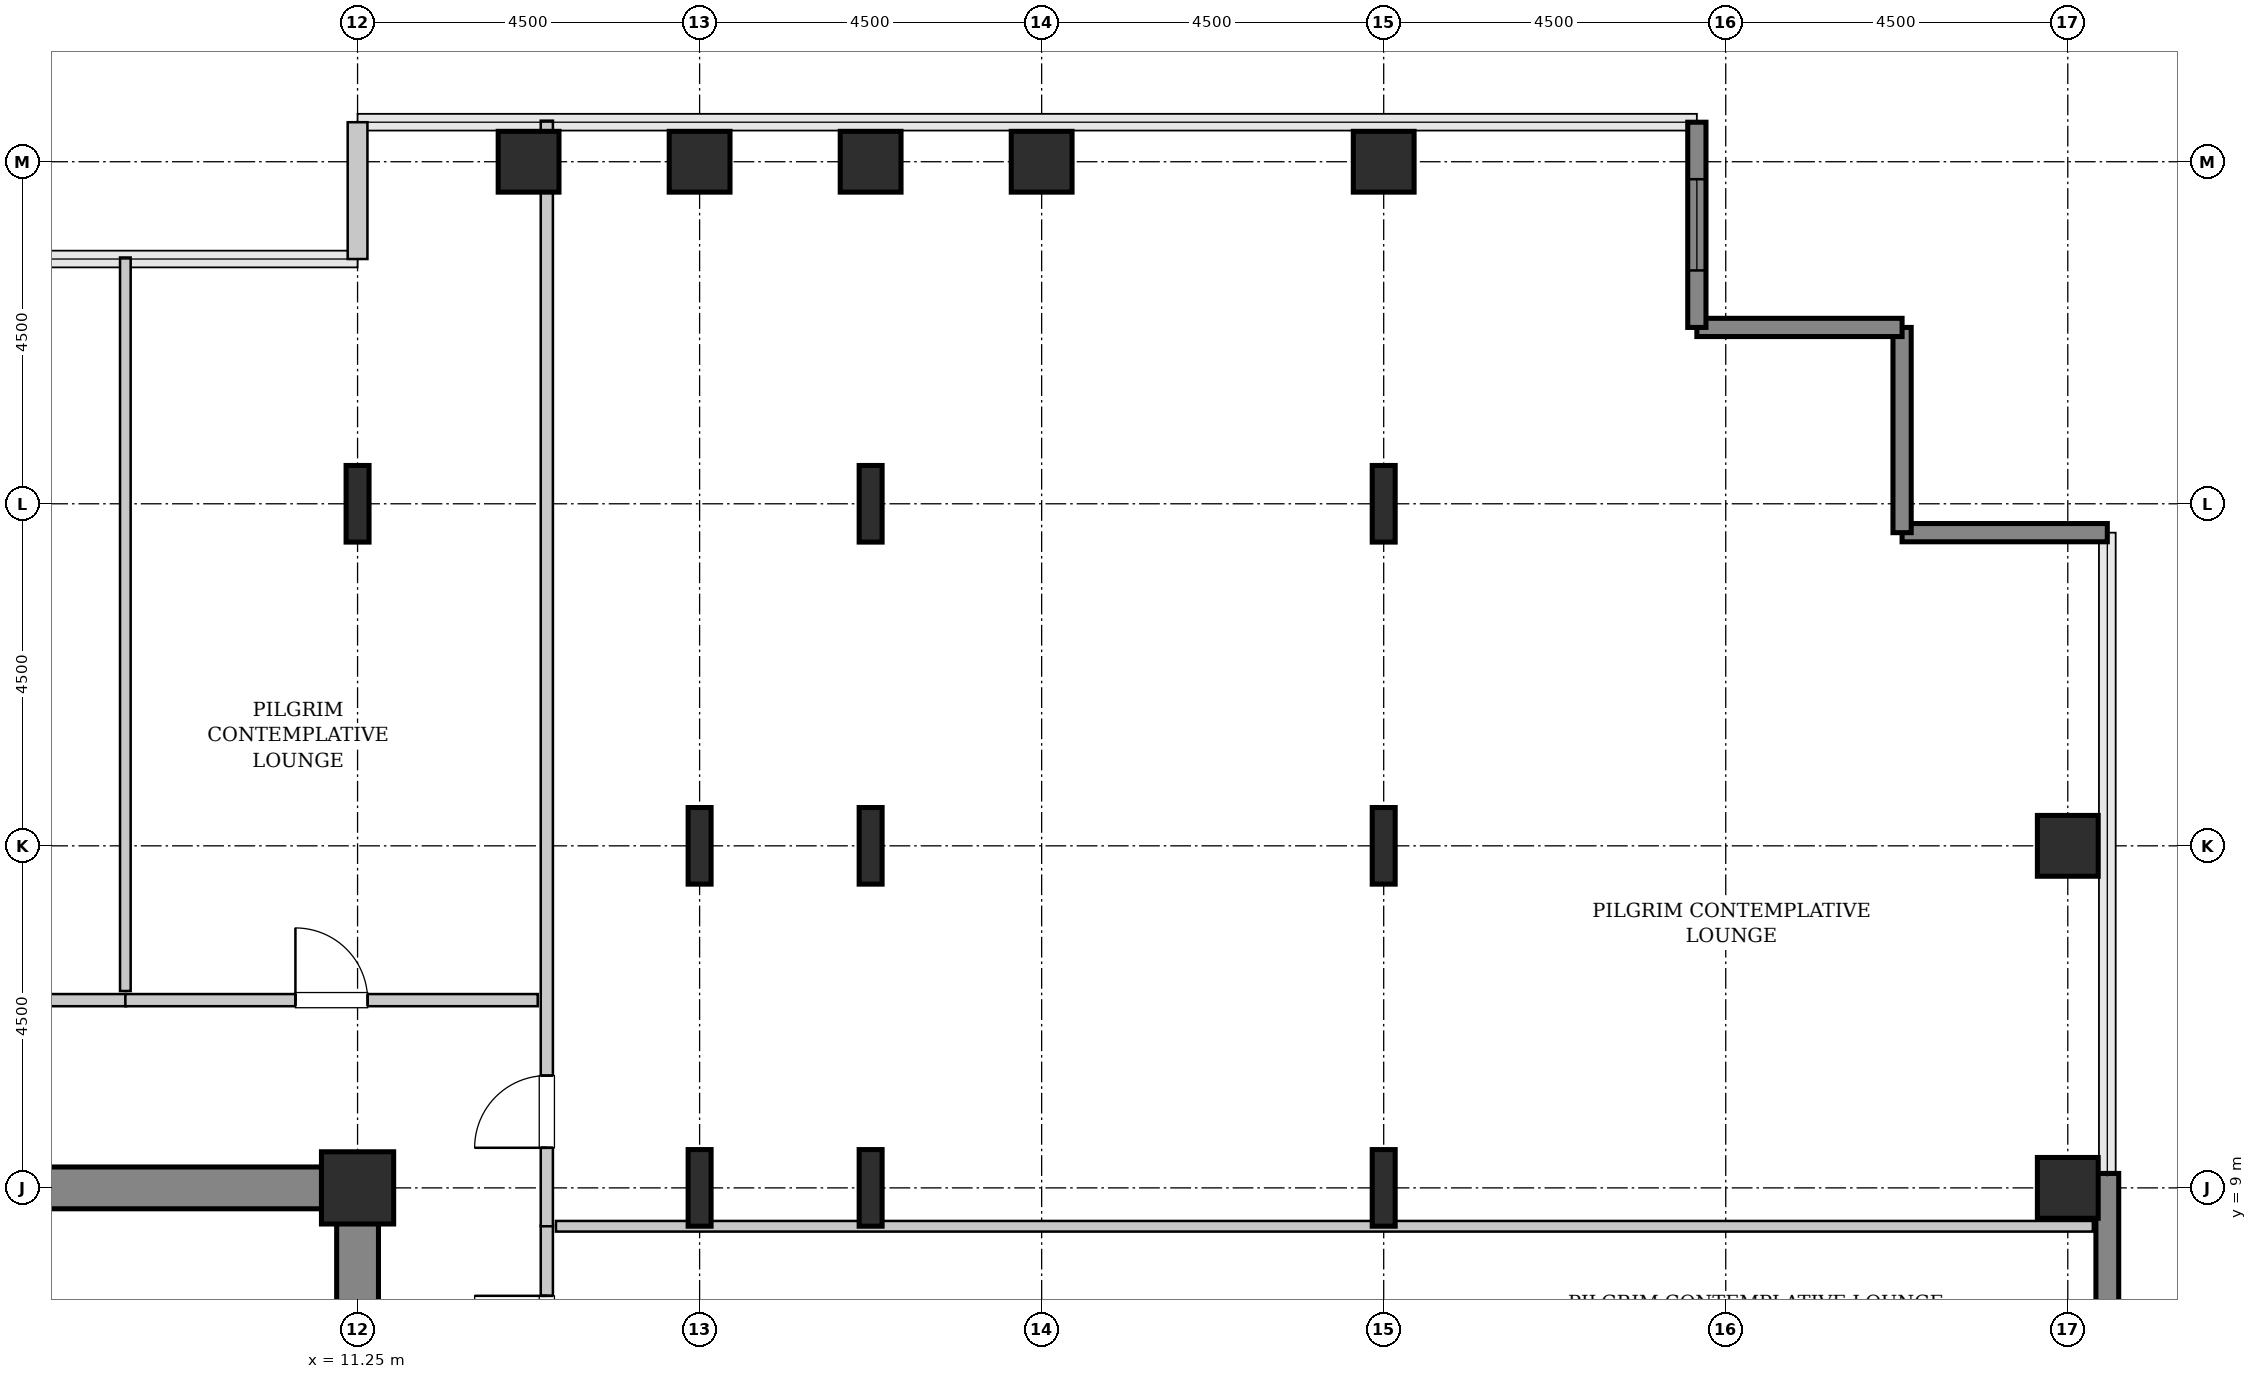
"""IFC4 building model, lengths in metres.
Left out: names, types, materials, properties, quantities, classifications, styles, units other than length and angle.
Written with IfcOpenShell. Run it as: python <this file> out.ifc"""

import sys

from ifc_helpers import new_model, si_unit, direction, frame, frame_2d, origin, origin_2d, place, context, subcontext, project, spatial, rectangle, hollow_rectangle, i_section, extrude, source, transform, mapped, element, fill, save


model = new_model("IFC4")
c1 = context("Model", 3, precision=1e-05, world=origin(), true_north=direction((0.0, 1.0)))
c2 = subcontext(c1, "Body", "Model", "MODEL_VIEW")
j1 = project(units=[si_unit("LENGTHUNIT", "METRE"), si_unit("PLANEANGLEUNIT", "RADIAN")], contexts=[c1])
p1 = place(None, origin())
s1 = spatial("IfcSite", under=j1, at=p1, CompositionType="ELEMENT")
p2 = place(p1, origin())
s2 = spatial("IfcBuilding", under=s1, at=p2, CompositionType="ELEMENT")
p3 = place(p2, frame((0.0, 0.0, 136.4)))
s3 = spatial("IfcBuildingStorey", under=s2, at=p3, CompositionType="ELEMENT", Elevation=136.4)
m1 = source(origin(), c2, "Body", "SweptSolid", [
    extrude(rectangle(XDim=9.975, YDim=0.55, at=frame_2d((4.987, 0.0))), origin(), (0.0, 0.0, 1.0), 3.8),
])
p4 = place(p3, frame((1.55, 9.0, 0.0), z_axis=(0.0, 0.0, 1.0), x_axis=(1.0, 0.0, 0.0)))
e1 = element("IfcWall", 1, at=p4, inside=s3, PredefinedType="SHEAR", context=c2, shape_type="MappedRepresentation", body=[
    mapped(m1, transform((0.0, 0.0, 0.0), x_axis=(1.0, 0.0, 0.0), y_axis=(0.0, 1.0, 0.0), z_axis=(0.0, 0.0, 1.0), scale=1.0)),
])
m2 = source(origin(), c2, "Body", "SweptSolid", [
    extrude(rectangle(XDim=7.375, YDim=0.55, at=frame_2d((3.688, 0.0))), origin(), (0.0, 0.0, 1.0), 3.8),
])
p5 = place(p3, frame((11.25, 1.35, 0.0), z_axis=(0.0, 0.0, 1.0), x_axis=(0.0, 1.0, 0.0)))
e2 = element("IfcWall", 2, at=p5, inside=s3, PredefinedType="SHEAR", context=c2, shape_type="MappedRepresentation", body=[
    mapped(m2, transform((0.0, 0.0, 0.0), x_axis=(1.0, 0.0, 0.0), y_axis=(0.0, 1.0, 0.0), z_axis=(0.0, 0.0, 1.0), scale=1.0)),
])
m3 = source(origin(), c2, "Body", "SweptSolid", [
    extrude(hollow_rectangle(XDim=0.95, YDim=0.95, WallThickness=0.045, InnerFilletRadius=0.045, OuterFilletRadius=0.09, at=origin_2d()), origin(), (0.0, 0.0, 1.0), 3.8),
])
p6 = place(p3, frame((11.25, 9.0, 0.0), z_axis=(0.0, 0.0, 1.0), x_axis=(1.0, 0.0, 0.0)))
e3 = element("IfcColumn", 3, at=p6, inside=s3, PredefinedType="COLUMN", context=c2, shape_type="MappedRepresentation", body=[
    mapped(m3, transform((0.0, 0.0, 0.0), x_axis=(1.0, 0.0, 0.0), y_axis=(0.0, 1.0, 0.0), z_axis=(0.0, 0.0, 1.0), scale=1.0)),
])
m4 = source(origin(), c2, "Body", "SweptSolid", [
    extrude(i_section(OverallWidth=0.302, OverallDepth=1.008, WebThickness=0.021, FlangeThickness=0.04, FilletRadius=0.03, at=origin_2d()), origin(), (0.0, 0.0, 1.0), 3.8),
])
p7 = place(p3, frame((11.25, 18.0, 0.0), z_axis=(0.0, 0.0, 1.0), x_axis=(1.0, 0.0, 0.0)))
e4 = element("IfcColumn", 4, at=p7, inside=s3, PredefinedType="COLUMN", context=c2, shape_type="MappedRepresentation", body=[
    mapped(m4, transform((0.0, 0.0, 0.0), x_axis=(1.0, 0.0, 0.0), y_axis=(0.0, 1.0, 0.0), z_axis=(0.0, 0.0, 1.0), scale=1.0)),
])
m5 = source(origin(), c2, "Body", "SweptSolid", [
    extrude(hollow_rectangle(XDim=0.8, YDim=0.8, WallThickness=0.04, InnerFilletRadius=0.04, OuterFilletRadius=0.08, at=origin_2d()), origin(), (0.0, 0.0, 1.0), 3.8),
])
p8 = place(p3, frame((13.5, 22.5, 0.0), z_axis=(0.0, 0.0, 1.0), x_axis=(1.0, 0.0, 0.0)))
e5 = element("IfcColumn", 5, at=p8, inside=s3, PredefinedType="COLUMN", context=c2, shape_type="MappedRepresentation", body=[
    mapped(m5, transform((0.0, 0.0, 0.0), x_axis=(1.0, 0.0, 0.0), y_axis=(0.0, 1.0, 0.0), z_axis=(0.0, 0.0, 1.0), scale=1.0)),
])
for number, where, z_axis, x_axis in (
    (6, (15.75, 9.0, 0.0), (0.0, 0.0, 1.0), (1.0, 0.0, 0.0)),
    (7, (15.75, 13.5, 0.0), (0.0, 0.0, 1.0), (1.0, 0.0, 0.0)),
):
    element("IfcColumn", number, at=place(p3, frame(where, z_axis=z_axis, x_axis=x_axis)), inside=s3, PredefinedType="COLUMN", context=c2, shape_type="MappedRepresentation", body=[
        mapped(m4, transform((0.0, 0.0, 0.0), x_axis=(1.0, 0.0, 0.0), y_axis=(0.0, 1.0, 0.0), z_axis=(0.0, 0.0, 1.0), scale=1.0)),
    ])
p9 = place(p3, frame((15.75, 22.5, 0.0), z_axis=(0.0, 0.0, 1.0), x_axis=(1.0, 0.0, 0.0)))
e8 = element("IfcColumn", 8, at=p9, inside=s3, PredefinedType="COLUMN", context=c2, shape_type="MappedRepresentation", body=[
    mapped(m5, transform((0.0, 0.0, 0.0), x_axis=(1.0, 0.0, 0.0), y_axis=(0.0, 1.0, 0.0), z_axis=(0.0, 0.0, 1.0), scale=1.0)),
])
for number, where, z_axis, x_axis in (
    (9, (18.0, 9.0, 0.0), (0.0, 0.0, 1.0), (1.0, 0.0, 0.0)),
    (10, (18.0, 13.5, 0.0), (0.0, 0.0, 1.0), (1.0, 0.0, 0.0)),
    (11, (18.0, 18.0, 0.0), (0.0, 0.0, 1.0), (1.0, 0.0, 0.0)),
):
    element("IfcColumn", number, at=place(p3, frame(where, z_axis=z_axis, x_axis=x_axis)), inside=s3, PredefinedType="COLUMN", context=c2, shape_type="MappedRepresentation", body=[
        mapped(m4, transform((0.0, 0.0, 0.0), x_axis=(1.0, 0.0, 0.0), y_axis=(0.0, 1.0, 0.0), z_axis=(0.0, 0.0, 1.0), scale=1.0)),
    ])
for number, where, z_axis, x_axis in (
    (12, (18.0, 22.5, 0.0), (0.0, 0.0, 1.0), (1.0, 0.0, 0.0)),
    (13, (20.25, 22.5, 0.0), (0.0, 0.0, 1.0), (1.0, 0.0, 0.0)),
):
    element("IfcColumn", number, at=place(p3, frame(where, z_axis=z_axis, x_axis=x_axis)), inside=s3, PredefinedType="COLUMN", context=c2, shape_type="MappedRepresentation", body=[
        mapped(m5, transform((0.0, 0.0, 0.0), x_axis=(1.0, 0.0, 0.0), y_axis=(0.0, 1.0, 0.0), z_axis=(0.0, 0.0, 1.0), scale=1.0)),
    ])
for number, where, z_axis, x_axis in (
    (14, (24.75, 9.0, 0.0), (0.0, 0.0, 1.0), (1.0, 0.0, 0.0)),
    (15, (24.75, 13.5, 0.0), (0.0, 0.0, 1.0), (1.0, 0.0, 0.0)),
    (16, (24.75, 18.0, 0.0), (0.0, 0.0, 1.0), (1.0, 0.0, 0.0)),
):
    element("IfcColumn", number, at=place(p3, frame(where, z_axis=z_axis, x_axis=x_axis)), inside=s3, PredefinedType="COLUMN", context=c2, shape_type="MappedRepresentation", body=[
        mapped(m4, transform((0.0, 0.0, 0.0), x_axis=(1.0, 0.0, 0.0), y_axis=(0.0, 1.0, 0.0), z_axis=(0.0, 0.0, 1.0), scale=1.0)),
    ])
for number, where, z_axis, x_axis in (
    (17, (24.75, 22.5, 0.0), (0.0, 0.0, 1.0), (1.0, 0.0, 0.0)),
    (18, (33.75, 9.0, 0.0), (0.0, 0.0, 1.0), (1.0, 0.0, 0.0)),
    (19, (33.75, 13.5, 0.0), (0.0, 0.0, 1.0), (1.0, 0.0, 0.0)),
):
    element("IfcColumn", number, at=place(p3, frame(where, z_axis=z_axis, x_axis=x_axis)), inside=s3, PredefinedType="COLUMN", context=c2, shape_type="MappedRepresentation", body=[
        mapped(m5, transform((0.0, 0.0, 0.0), x_axis=(1.0, 0.0, 0.0), y_axis=(0.0, 1.0, 0.0), z_axis=(0.0, 0.0, 1.0), scale=1.0)),
    ])
m6 = source(origin(), c2, "Body", "SweptSolid", [
    extrude(rectangle(XDim=4.88, YDim=0.3, at=frame_2d((2.44, 0.0))), origin(), (0.0, 0.0, 1.0), 3.55),
])
p10 = place(p3, frame((34.27, 4.31, 0.0), z_axis=(0.0, 0.0, 1.0), x_axis=(0.0, 1.0, 0.0)))
e20 = element("IfcWall", 20, at=p10, inside=s3, PredefinedType="SHEAR", context=c2, shape_type="MappedRepresentation", body=[
    mapped(m6, transform((0.0, 0.0, 0.0), x_axis=(1.0, 0.0, 0.0), y_axis=(0.0, 1.0, 0.0), z_axis=(0.0, 0.0, 1.0), scale=1.0)),
])
m7 = source(origin(), c2, "Body", "SweptSolid", [
    extrude(rectangle(XDim=2.7, YDim=0.24, at=frame_2d((1.35, 0.0))), origin(), (0.0, 0.0, 1.0), 3.55),
])
for number, where, z_axis, x_axis in (
    (21, (34.27, 17.62, 0.0), (0.0, 0.0, 1.0), (-1.0, 0.0, 0.0)),
    (22, (31.57, 17.62, 0.0), (0.0, 0.0, 1.0), (0.0, 1.0, 0.0)),
    (23, (31.57, 20.32, 0.0), (0.0, 0.0, 1.0), (-1.0, 0.0, 0.0)),
):
    element("IfcWall", number, at=place(p3, frame(where, z_axis=z_axis, x_axis=x_axis)), inside=s3, PredefinedType="SHEAR", context=c2, shape_type="MappedRepresentation", body=[
        mapped(m7, transform((0.0, 0.0, 0.0), x_axis=(1.0, 0.0, 0.0), y_axis=(0.0, 1.0, 0.0), z_axis=(0.0, 0.0, 1.0), scale=1.0)),
    ])
p11 = place(p3, frame((28.87, 20.32, 0.0), z_axis=(0.0, 0.0, 1.0), x_axis=(0.0, 1.0, 0.0)))
e24 = element("IfcWall", 24, at=p11, inside=s3, PredefinedType="SHEAR", context=c2, shape_type="MappedRepresentation", body=[
    mapped(m7, transform((0.0, 0.0, 0.0), x_axis=(1.0, 0.0, 0.0), y_axis=(0.0, 1.0, 0.0), z_axis=(0.0, 0.0, 1.0), scale=1.0)),
])
p12 = place(p11, frame((0.75, 0.0, 0.85)))
e25 = element("IfcOpeningElement", 25, at=p12, cuts=e24, PredefinedType="OPENING", context=c2, shape_type="SweptSolid", body=[
    extrude(rectangle(XDim=1.2, YDim=1.8, at=frame_2d((0.6, 0.9))), frame((0.0, 0.13, 0.0), z_axis=(0.0, -1.0, 0.0), x_axis=(1.0, 0.0, 0.0)), (0.0, 0.0, 1.0), 0.26),
])
m8 = source(origin(), c2, "Body", "SweptSolid", [
    extrude(rectangle(XDim=1.8, YDim=0.26, at=frame_2d((0.9, 0.0))), origin(), (0.0, 0.0, 1.0), 3.55),
])
p13 = place(p3, frame((11.25, 23.02, 0.0), z_axis=(0.0, 0.0, 1.0), x_axis=(0.0, -1.0, 0.0)))
e26 = element("IfcWall", 26, at=p13, inside=s3, PredefinedType="SOLIDWALL", context=c2, shape_type="MappedRepresentation", body=[
    mapped(m8, transform((0.0, 0.0, 0.0), x_axis=(1.0, 0.0, 0.0), y_axis=(0.0, 1.0, 0.0), z_axis=(0.0, 0.0, 1.0), scale=1.0)),
])
m9 = source(origin(), c2, "Body", "SweptSolid", [
    extrude(rectangle(XDim=2.8, YDim=0.16, at=frame_2d((1.4, 0.0))), origin(), (0.0, 0.0, 1.0), 3.535),
])
p14 = place(p3, frame((13.74, 5.705, 0.0), z_axis=(0.0, 0.0, 1.0), x_axis=(0.0, 1.0, 0.0)))
e27 = element("IfcWall", 27, at=p14, inside=s3, PredefinedType="PARTITIONING", context=c2, shape_type="MappedRepresentation", body=[
    mapped(m9, transform((0.0, 0.0, 0.0), x_axis=(1.0, 0.0, 0.0), y_axis=(0.0, 1.0, 0.0), z_axis=(0.0, 0.0, 1.0), scale=1.0)),
])
p15 = place(p14, frame((0.925, 0.0, 0.0)))
e28 = element("IfcOpeningElement", 28, at=p15, cuts=e27, PredefinedType="OPENING", context=c2, shape_type="SweptSolid", body=[
    extrude(rectangle(XDim=0.95, YDim=2.1, at=frame_2d((0.475, 1.05))), frame((0.0, 0.09, 0.0), z_axis=(0.0, -1.0, 0.0), x_axis=(1.0, 0.0, 0.0)), (0.0, 0.0, 1.0), 0.18),
])
m10 = source(origin(), c2, "Body", "SweptSolid", [
    extrude(rectangle(XDim=20.22, YDim=0.14, at=frame_2d((10.11, 0.0))), origin(), (0.0, 0.0, 1.0), 2.875),
])
p16 = place(p3, frame((13.86, 8.495, 0.0), z_axis=(0.0, 0.0, 1.0), x_axis=(1.0, 0.0, 0.0)))
e29 = element("IfcWall", 29, at=p16, inside=s3, PredefinedType="PARTITIONING", context=c2, shape_type="MappedRepresentation", body=[
    mapped(m10, transform((0.0, 0.0, 0.0), x_axis=(1.0, 0.0, 0.0), y_axis=(0.0, 1.0, 0.0), z_axis=(0.0, 0.0, 1.0), scale=1.0)),
])
m11 = source(origin(), c2, "Body", "SweptSolid", [
    extrude(rectangle(XDim=14.545, YDim=0.16, at=frame_2d((7.272, 0.0))), origin(), (0.0, 0.0, 1.0), 3.535),
])
p17 = place(p3, frame((13.74, 8.495, 0.0), z_axis=(0.0, 0.0, 1.0), x_axis=(0.0, 1.0, 0.0)))
e30 = element("IfcWall", 30, at=p17, inside=s3, PredefinedType="PARTITIONING", context=c2, shape_type="MappedRepresentation", body=[
    mapped(m11, transform((0.0, 0.0, 0.0), x_axis=(1.0, 0.0, 0.0), y_axis=(0.0, 1.0, 0.0), z_axis=(0.0, 0.0, 1.0), scale=1.0)),
])
p18 = place(p17, frame((1.032, 0.0, 0.0)))
e31 = element("IfcOpeningElement", 31, at=p18, cuts=e30, PredefinedType="OPENING", context=c2, shape_type="SweptSolid", body=[
    extrude(rectangle(XDim=0.95, YDim=2.1, at=frame_2d((0.475, 1.05))), frame((0.0, 0.09, 0.0), z_axis=(0.0, -1.0, 0.0), x_axis=(1.0, 0.0, 0.0)), (0.0, 0.0, 1.0), 0.18),
])
m12 = source(origin(), c2, "Body", "SweptSolid", [
    extrude(rectangle(XDim=5.61, YDim=0.16, at=frame_2d((2.805, 0.0))), origin(), (0.0, 0.0, 1.0), 3.535),
])
p19 = place(p3, frame((2.595, 11.47, 0.0), z_axis=(0.0, 0.0, 1.0), x_axis=(1.0, 0.0, 0.0)))
e32 = element("IfcWall", 32, at=p19, inside=s3, PredefinedType="PARTITIONING", context=c2, shape_type="MappedRepresentation", body=[
    mapped(m12, transform((0.0, 0.0, 0.0), x_axis=(1.0, 0.0, 0.0), y_axis=(0.0, 1.0, 0.0), z_axis=(0.0, 0.0, 1.0), scale=1.0)),
])
p20 = place(p19, frame((2.33, 0.0, 0.0)))
e33 = element("IfcOpeningElement", 33, at=p20, cuts=e32, PredefinedType="OPENING", context=c2, shape_type="SweptSolid", body=[
    extrude(rectangle(XDim=0.95, YDim=2.1, at=frame_2d((0.475, 1.05))), frame((0.0, 0.09, 0.0), z_axis=(0.0, -1.0, 0.0), x_axis=(1.0, 0.0, 0.0)), (0.0, 0.0, 1.0), 0.18),
])
m13 = source(origin(), c2, "Body", "SweptSolid", [
    extrude(rectangle(XDim=9.65, YDim=0.14, at=frame_2d((4.825, 0.0))), origin(), (0.0, 0.0, 1.0), 3.535),
])
p21 = place(p3, frame((8.195, 11.59, 0.0), z_axis=(0.0, 0.0, 1.0), x_axis=(0.0, 1.0, 0.0)))
e34 = element("IfcWall", 34, at=p21, inside=s3, PredefinedType="PARTITIONING", context=c2, shape_type="MappedRepresentation", body=[
    mapped(m13, transform((0.0, 0.0, 0.0), x_axis=(1.0, 0.0, 0.0), y_axis=(0.0, 1.0, 0.0), z_axis=(0.0, 0.0, 1.0), scale=1.0)),
])
m14 = source(origin(), c2, "Body", "SweptSolid", [
    extrude(rectangle(XDim=5.425, YDim=0.16, at=frame_2d((2.712, 0.0))), origin(), (0.0, 0.0, 1.0), 3.535),
])
p22 = place(p3, frame((8.195, 11.47, 0.0), z_axis=(0.0, 0.0, 1.0), x_axis=(1.0, 0.0, 0.0)))
e35 = element("IfcWall", 35, at=p22, inside=s3, PredefinedType="PARTITIONING", context=c2, shape_type="MappedRepresentation", body=[
    mapped(m14, transform((0.0, 0.0, 0.0), x_axis=(1.0, 0.0, 0.0), y_axis=(0.0, 1.0, 0.0), z_axis=(0.0, 0.0, 1.0), scale=1.0)),
])
p23 = place(p22, frame((2.238, 0.0, 0.0)))
e36 = element("IfcOpeningElement", 36, at=p23, cuts=e35, PredefinedType="OPENING", context=c2, shape_type="SweptSolid", body=[
    extrude(rectangle(XDim=0.95, YDim=2.1, at=frame_2d((0.475, 1.05))), frame((0.0, 0.09, 0.0), z_axis=(0.0, -1.0, 0.0), x_axis=(1.0, 0.0, 0.0)), (0.0, 0.0, 1.0), 0.18),
])
m15 = source(origin(), c2, "Body", "SweptSolid", [
    extrude(rectangle(XDim=1.2, YDim=1.8, at=frame_2d((0.6, 0.9))), frame((0.0, 0.03, 0.0), z_axis=(0.0, -1.0, 0.0), x_axis=(1.0, 0.0, 0.0)), (0.0, 0.0, 1.0), 0.06),
])
p24 = place(p12, origin())
e37 = element("IfcWindow", 37, at=p24, inside=s3, PartitioningType="SINGLE_PANEL", PredefinedType="WINDOW", context=c2, shape_type="MappedRepresentation", body=[
    mapped(m15, transform((0.0, 0.0, 0.0), x_axis=(1.0, 0.0, 0.0), y_axis=(0.0, 1.0, 0.0), z_axis=(0.0, 0.0, 1.0), scale=1.0)),
])
fill(e25, e37)
m16 = source(origin(), c2, "Body", "SweptSolid", [
    extrude(rectangle(XDim=0.95, YDim=2.1, at=frame_2d((0.475, 1.05))), frame((0.0, 0.025, 0.0), z_axis=(0.0, -1.0, 0.0), x_axis=(1.0, 0.0, 0.0)), (0.0, 0.0, 1.0), 0.05),
])
p25 = place(p15, origin())
e38 = element("IfcDoor", 38, at=p25, inside=s3, OperationType="SINGLE_SWING_RIGHT", PredefinedType="DOOR", context=c2, shape_type="MappedRepresentation", body=[
    mapped(m16, transform((0.0, 0.0, 0.0), x_axis=(1.0, 0.0, 0.0), y_axis=(0.0, 1.0, 0.0), z_axis=(0.0, 0.0, 1.0), scale=1.0)),
])
fill(e28, e38)
p26 = place(p18, origin())
e39 = element("IfcDoor", 39, at=p26, inside=s3, OperationType="SINGLE_SWING_LEFT", PredefinedType="DOOR", context=c2, shape_type="MappedRepresentation", body=[
    mapped(m16, transform((0.0, 0.0, 0.0), x_axis=(1.0, 0.0, 0.0), y_axis=(0.0, 1.0, 0.0), z_axis=(0.0, 0.0, 1.0), scale=1.0)),
])
fill(e31, e39)
p27 = place(p23, origin())
e40 = element("IfcDoor", 40, at=p27, inside=s3, OperationType="SINGLE_SWING_LEFT", PredefinedType="DOOR", context=c2, shape_type="MappedRepresentation", body=[
    mapped(m16, transform((0.0, 0.0, 0.0), x_axis=(1.0, 0.0, 0.0), y_axis=(0.0, 1.0, 0.0), z_axis=(0.0, 0.0, 1.0), scale=1.0)),
])
fill(e36, e40)
save(model, sys.argv[1])
